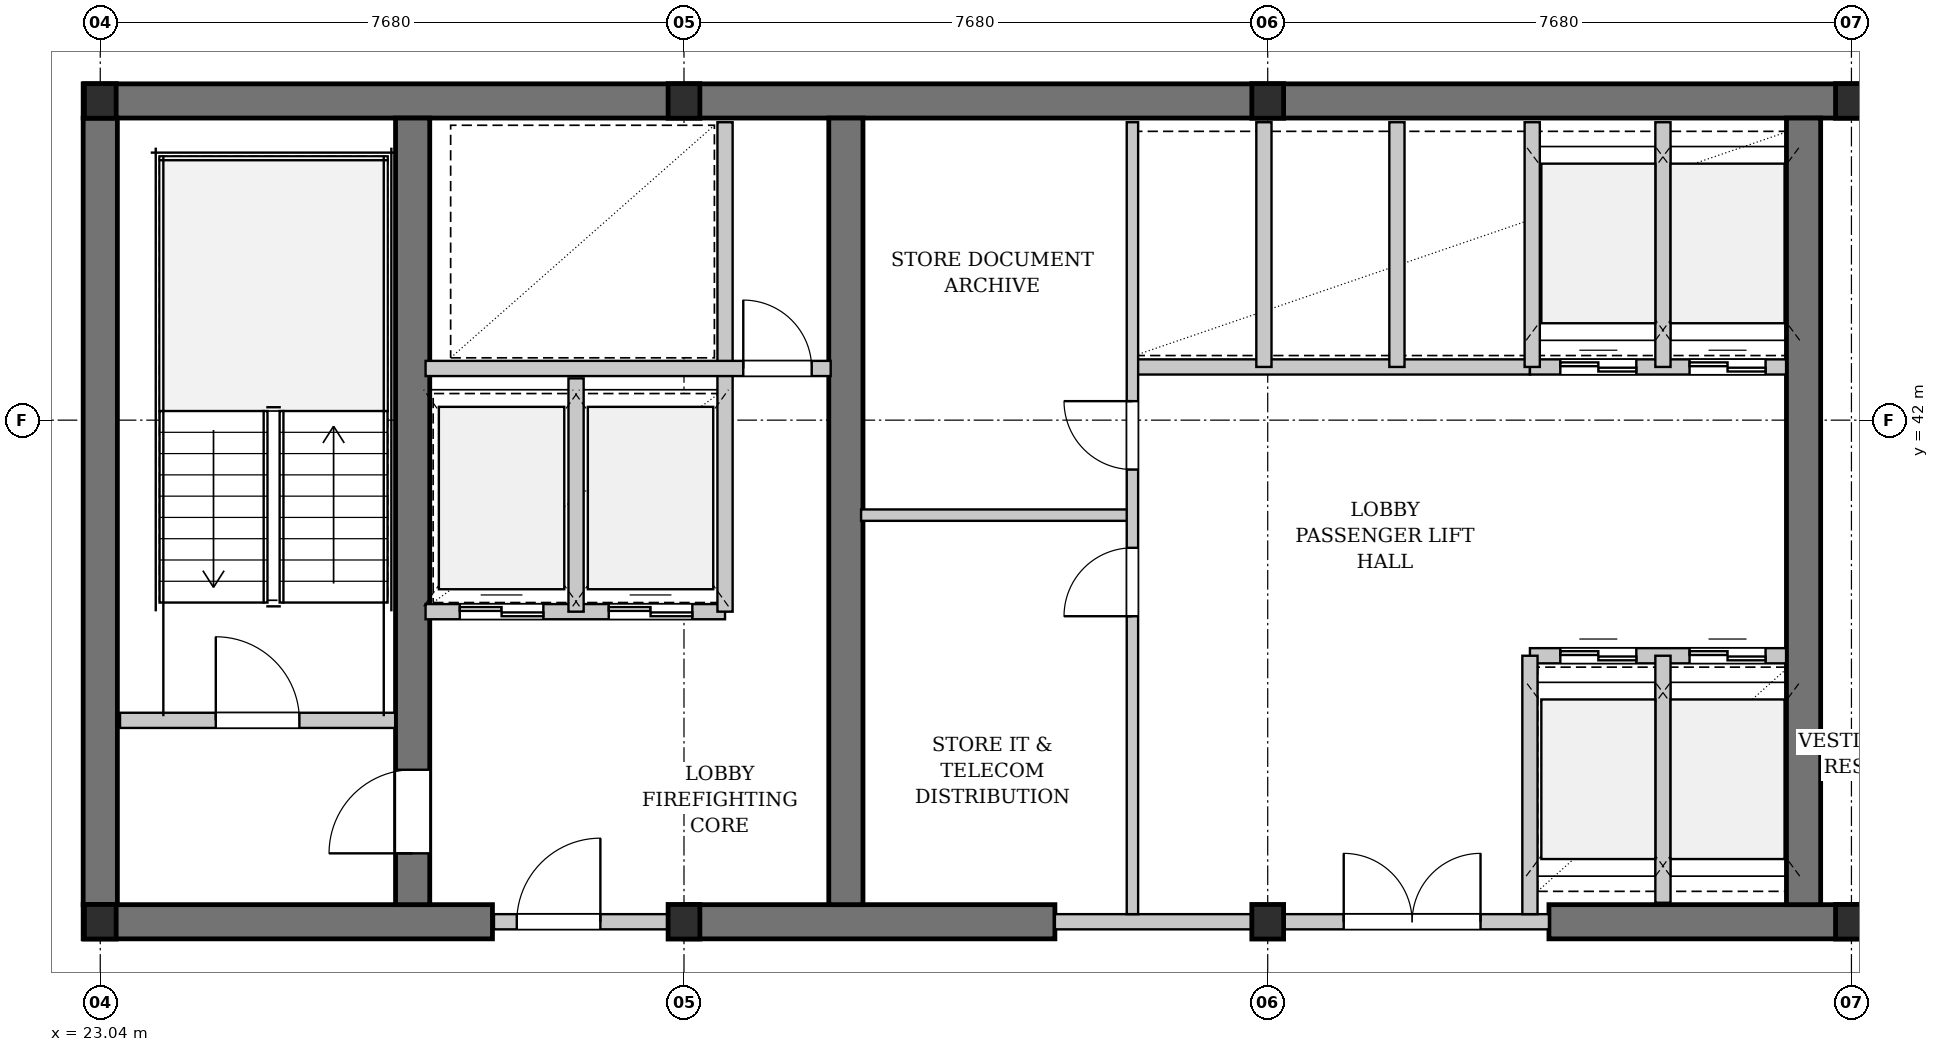
"""IFC4 building model, lengths in metres.
Left out: names, types, materials, properties, quantities, classifications, styles, units other than length and angle.
Written with IfcOpenShell. Run it as: python <this file> out.ifc"""

import sys

from ifc_helpers import new_model, si_unit, direction, frame, frame_2d, origin, origin_2d, place, context, subcontext, project, spatial, rectangle, i_section, extrude, element, fill, save


model = new_model("IFC4")
c1 = context("Model", 3, precision=1e-05, world=origin(), true_north=direction((0.0, 1.0)))
c2 = subcontext(c1, "Body", "Model", "MODEL_VIEW")
j1 = project(units=[si_unit("LENGTHUNIT", "METRE"), si_unit("PLANEANGLEUNIT", "RADIAN")], contexts=[c1])
p1 = place(None, origin())
s1 = spatial("IfcSite", under=j1, at=p1, CompositionType="ELEMENT")
p2 = place(p1, origin())
s2 = spatial("IfcBuilding", under=s1, at=p2, CompositionType="ELEMENT")
p3 = place(p2, frame((0.0, 0.0, 178.7)))
s3 = spatial("IfcBuildingStorey", under=s2, at=p3, CompositionType="ELEMENT", Elevation=178.7)
p4 = place(p3, frame((22.815, 46.2, 0.0), z_axis=(0.0, 0.0, 1.0), x_axis=(1.0, 0.0, 0.0)))
e1 = element("IfcWall", 1, at=p4, inside=s3, PredefinedType="SHEAR", context=c2, shape_type="SweptSolid", body=[
    extrude(rectangle(XDim=31.17, YDim=0.45, at=frame_2d((15.585, 0.0))), origin(), (0.0, 0.0, 1.0), 3.08),
])
p5 = place(p3, frame((22.815, 35.4, 0.0), z_axis=(0.0, 0.0, 1.0), x_axis=(1.0, 0.0, 0.0)))
e2 = element("IfcWall", 2, at=p5, inside=s3, PredefinedType="SHEAR", context=c2, shape_type="SweptSolid", body=[
    extrude(rectangle(XDim=5.385, YDim=0.45, at=frame_2d((2.692, 0.0))), origin(), (0.0, 0.0, 1.0), 3.08),
])
p6 = place(p3, frame((30.72, 35.4, 0.0), z_axis=(0.0, 0.0, 1.0), x_axis=(1.0, 0.0, 0.0)))
e3 = element("IfcWall", 3, at=p6, inside=s3, PredefinedType="SHEAR", context=c2, shape_type="SweptSolid", body=[
    extrude(rectangle(XDim=4.88, YDim=0.45, at=frame_2d((2.44, 0.0))), origin(), (0.0, 0.0, 1.0), 3.08),
])
p7 = place(p3, frame((42.1, 35.4, 0.0), z_axis=(0.0, 0.0, 1.0), x_axis=(1.0, 0.0, 0.0)))
e4 = element("IfcWall", 4, at=p7, inside=s3, PredefinedType="SHEAR", context=c2, shape_type="SweptSolid", body=[
    extrude(rectangle(XDim=8.05, YDim=0.45, at=frame_2d((4.025, 0.0))), origin(), (0.0, 0.0, 1.0), 3.08),
])
p8 = place(p7, frame((4.85, 0.0, 0.0)))
e5 = element("IfcOpeningElement", 5, at=p8, cuts=e4, PredefinedType="OPENING", context=c2, shape_type="SweptSolid", body=[
    extrude(rectangle(XDim=0.9, YDim=2.15, at=frame_2d((0.45, 1.075))), frame((0.0, 0.235, 0.0), z_axis=(0.0, -1.0, 0.0), x_axis=(1.0, 0.0, 0.0)), (0.0, 0.0, 1.0), 0.47),
])
p9 = place(p3, frame((23.04, 35.625, 0.0), z_axis=(0.0, 0.0, 1.0), x_axis=(0.0, 1.0, 0.0)))
e6 = element("IfcWall", 6, at=p9, inside=s3, PredefinedType="SHEAR", context=c2, shape_type="SweptSolid", body=[
    extrude(rectangle(XDim=10.35, YDim=0.45, at=frame_2d((5.175, 0.0))), origin(), (0.0, 0.0, 1.0), 3.08),
])
p10 = place(p3, frame((27.15, 35.625, 0.0), z_axis=(0.0, 0.0, 1.0), x_axis=(0.0, 1.0, 0.0)))
e7 = element("IfcWall", 7, at=p10, inside=s3, PredefinedType="SHEAR", context=c2, shape_type="SweptSolid", body=[
    extrude(rectangle(XDim=10.35, YDim=0.45, at=frame_2d((5.175, 0.0))), origin(), (0.0, 0.0, 1.0), 3.08),
])
p11 = place(p10, frame((0.675, 0.0, 0.0)))
e8 = element("IfcOpeningElement", 8, at=p11, cuts=e7, PredefinedType="OPENING", context=c2, shape_type="SweptSolid", body=[
    extrude(rectangle(XDim=1.1, YDim=2.15, at=frame_2d((0.55, 1.075))), frame((0.0, 0.235, 0.0), z_axis=(0.0, -1.0, 0.0), x_axis=(1.0, 0.0, 0.0)), (0.0, 0.0, 1.0), 0.47),
])
for number, where, z_axis, x_axis in (
    (9, (32.85, 35.625, 0.0), (0.0, 0.0, 1.0), (0.0, 1.0, 0.0)),
    (10, (45.45, 35.625, 0.0), (0.0, 0.0, 1.0), (0.0, 1.0, 0.0)),
):
    element("IfcWall", number, at=place(p3, frame(where, z_axis=z_axis, x_axis=x_axis)), inside=s3, PredefinedType="SHEAR", context=c2, shape_type="SweptSolid", body=[
        extrude(rectangle(XDim=10.35, YDim=0.45, at=frame_2d((5.175, 0.0))), origin(), (0.0, 0.0, 1.0), 3.08),
    ])
for number, where, z_axis, x_axis in (
    (11, (23.04, 35.4, 0.0), (0.0, 0.0, 1.0), (1.0, 0.0, 0.0)),
    (12, (23.04, 46.2, 0.0), (0.0, 0.0, 1.0), (1.0, 0.0, 0.0)),
    (13, (30.72, 35.4, 0.0), (0.0, 0.0, 1.0), (1.0, 0.0, 0.0)),
    (14, (30.72, 46.2, 0.0), (0.0, 0.0, 1.0), (1.0, 0.0, 0.0)),
    (15, (38.4, 35.4, 0.0), (0.0, 0.0, 1.0), (1.0, 0.0, 0.0)),
    (16, (38.4, 46.2, 0.0), (0.0, 0.0, 1.0), (1.0, 0.0, 0.0)),
    (17, (46.08, 35.4, 0.0), (0.0, 0.0, 1.0), (1.0, 0.0, 0.0)),
    (18, (46.08, 46.2, 0.0), (0.0, 0.0, 1.0), (1.0, 0.0, 0.0)),
):
    element("IfcColumn", number, at=place(p3, frame(where, z_axis=z_axis, x_axis=x_axis)), inside=s3, PredefinedType="COLUMN", context=c2, shape_type="SweptSolid", body=[
        extrude(i_section(OverallWidth=0.418, OverallDepth=0.455, WebThickness=0.042, FlangeThickness=0.068, FilletRadius=0.015, at=origin_2d()), origin(), (0.0, 0.0, 1.0), 3.3),
    ])
p12 = place(p3, frame((23.3, 38.05, 0.0), z_axis=(0.0, 0.0, 1.0), x_axis=(1.0, 0.0, 0.0)))
e19 = element("IfcWall", 19, at=p12, inside=s3, PredefinedType="PARTITIONING", context=c2, shape_type="SweptSolid", body=[
    extrude(rectangle(XDim=3.62, YDim=0.2, at=frame_2d((1.81, 0.0))), origin(), (0.0, 0.0, 1.0), 3.08),
])
p13 = place(p12, frame((1.26, 0.0, 0.0)))
e20 = element("IfcOpeningElement", 20, at=p13, cuts=e19, PredefinedType="OPENING", context=c2, shape_type="SweptSolid", body=[
    extrude(rectangle(XDim=1.1, YDim=2.15, at=frame_2d((0.55, 1.075))), frame((0.0, 0.11, 0.0), z_axis=(0.0, -1.0, 0.0), x_axis=(1.0, 0.0, 0.0)), (0.0, 0.0, 1.0), 0.22),
])
p14 = place(p3, frame((28.22, 35.4, 0.0), z_axis=(0.0, 0.0, 1.0), x_axis=(1.0, 0.0, 0.0)))
e21 = element("IfcWall", 21, at=p14, inside=s3, PredefinedType="PARTITIONING", context=c2, shape_type="SweptSolid", body=[
    extrude(rectangle(XDim=2.5, YDim=0.2, at=frame_2d((1.25, 0.0))), origin(), (0.0, 0.0, 1.0), 2.475),
])
p15 = place(p14, frame((0.3, 0.0, 0.0)))
e22 = element("IfcOpeningElement", 22, at=p15, cuts=e21, PredefinedType="OPENING", context=c2, shape_type="SweptSolid", body=[
    extrude(rectangle(XDim=1.1, YDim=2.15, at=frame_2d((0.55, 1.075))), frame((0.0, 0.11, 0.0), z_axis=(0.0, -1.0, 0.0), x_axis=(1.0, 0.0, 0.0)), (0.0, 0.0, 1.0), 0.22),
])
p16 = place(p3, frame((27.32, 39.48, 0.0), z_axis=(0.0, 0.0, 1.0), x_axis=(1.0, 0.0, 0.0)))
e23 = element("IfcWall", 23, at=p16, inside=s3, PredefinedType="PARTITIONING", context=c2, shape_type="SweptSolid", body=[
    extrude(rectangle(XDim=3.94, YDim=0.2, at=frame_2d((1.97, 0.0))), origin(), (0.0, 0.0, 1.0), 3.08),
])
p17 = place(p16, frame((0.45, 0.0, 0.0)))
e24 = element("IfcOpeningElement", 24, at=p17, cuts=e23, PredefinedType="OPENING", context=c2, shape_type="SweptSolid", body=[
    extrude(rectangle(XDim=1.1, YDim=2.2, at=frame_2d((0.55, 1.1))), frame((0.0, 0.11, 0.0), z_axis=(0.0, -1.0, 0.0), x_axis=(1.0, 0.0, 0.0)), (0.0, 0.0, 1.0), 0.22),
])
p18 = place(p16, frame((2.41, 0.0, 0.0)))
e25 = element("IfcOpeningElement", 25, at=p18, cuts=e23, PredefinedType="OPENING", context=c2, shape_type="SweptSolid", body=[
    extrude(rectangle(XDim=1.1, YDim=2.2, at=frame_2d((0.55, 1.1))), frame((0.0, 0.11, 0.0), z_axis=(0.0, -1.0, 0.0), x_axis=(1.0, 0.0, 0.0)), (0.0, 0.0, 1.0), 0.22),
])
p19 = place(p3, frame((29.3, 39.48, 0.0), z_axis=(0.0, 0.0, 1.0), x_axis=(0.0, 1.0, 0.0)))
e26 = element("IfcWall", 26, at=p19, inside=s3, PredefinedType="PARTITIONING", context=c2, shape_type="SweptSolid", body=[
    extrude(rectangle(XDim=3.07, YDim=0.2, at=frame_2d((1.535, 0.0))), origin(), (0.0, 0.0, 1.0), 3.08),
])
p20 = place(p3, frame((31.26, 39.48, 0.0), z_axis=(0.0, 0.0, 1.0), x_axis=(0.0, 1.0, 0.0)))
e27 = element("IfcWall", 27, at=p20, inside=s3, PredefinedType="PARTITIONING", context=c2, shape_type="SweptSolid", body=[
    extrude(rectangle(XDim=6.44, YDim=0.2, at=frame_2d((3.22, 0.0))), origin(), (0.0, 0.0, 1.0), 3.08),
])
p21 = place(p3, frame((27.32, 42.68, 0.0), z_axis=(0.0, 0.0, 1.0), x_axis=(1.0, 0.0, 0.0)))
e28 = element("IfcWall", 28, at=p21, inside=s3, PredefinedType="PARTITIONING", context=c2, shape_type="SweptSolid", body=[
    extrude(rectangle(XDim=5.33, YDim=0.2, at=frame_2d((2.665, 0.0))), origin(), (0.0, 0.0, 1.0), 3.08),
])
p22 = place(p21, frame((4.18, 0.0, 0.0)))
e29 = element("IfcOpeningElement", 29, at=p22, cuts=e28, PredefinedType="OPENING", context=c2, shape_type="SweptSolid", body=[
    extrude(rectangle(XDim=0.9, YDim=2.15, at=frame_2d((0.45, 1.075))), frame((0.0, 0.11, 0.0), z_axis=(0.0, -1.0, 0.0), x_axis=(1.0, 0.0, 0.0)), (0.0, 0.0, 1.0), 0.22),
])
p23 = place(p3, frame((35.6, 35.4, 0.0), z_axis=(0.0, 0.0, 1.0), x_axis=(1.0, 0.0, 0.0)))
e30 = element("IfcWall", 30, at=p23, inside=s3, PredefinedType="PARTITIONING", context=c2, shape_type="SweptSolid", body=[
    extrude(rectangle(XDim=6.5, YDim=0.2, at=frame_2d((3.25, 0.0))), origin(), (0.0, 0.0, 1.0), 2.475),
])
p24 = place(p23, frame((3.8, 0.0, 0.0)))
e31 = element("IfcOpeningElement", 31, at=p24, cuts=e30, PredefinedType="OPENING", context=c2, shape_type="SweptSolid", body=[
    extrude(rectangle(XDim=1.8, YDim=2.3, at=frame_2d((0.9, 1.15))), frame((0.0, 0.11, 0.0), z_axis=(0.0, -1.0, 0.0), x_axis=(1.0, 0.0, 0.0)), (0.0, 0.0, 1.0), 0.22),
])
p25 = place(p3, frame((36.6, 42.7, 0.0), z_axis=(0.0, 0.0, 1.0), x_axis=(1.0, 0.0, 0.0)))
e32 = element("IfcWall", 32, at=p25, inside=s3, PredefinedType="PARTITIONING", context=c2, shape_type="SweptSolid", body=[
    extrude(rectangle(XDim=5.25, YDim=0.2, at=frame_2d((2.625, 0.0))), origin(), (0.0, 0.0, 1.0), 3.08),
])
p26 = place(p3, frame((38.35, 42.7, 0.0), z_axis=(0.0, 0.0, 1.0), x_axis=(0.0, 1.0, 0.0)))
e33 = element("IfcWall", 33, at=p26, inside=s3, PredefinedType="PARTITIONING", context=c2, shape_type="SweptSolid", body=[
    extrude(rectangle(XDim=3.22, YDim=0.2, at=frame_2d((1.61, 0.0))), origin(), (0.0, 0.0, 1.0), 2.475),
])
p27 = place(p3, frame((40.1, 42.7, 0.0), z_axis=(0.0, 0.0, 1.0), x_axis=(0.0, 1.0, 0.0)))
e34 = element("IfcWall", 34, at=p27, inside=s3, PredefinedType="PARTITIONING", context=c2, shape_type="SweptSolid", body=[
    extrude(rectangle(XDim=3.22, YDim=0.2, at=frame_2d((1.61, 0.0))), origin(), (0.0, 0.0, 1.0), 3.08),
])
p28 = place(p3, frame((33.05, 40.75, 0.0), z_axis=(0.0, 0.0, 1.0), x_axis=(1.0, 0.0, 0.0)))
e35 = element("IfcWall", 35, at=p28, inside=s3, PredefinedType="PARTITIONING", context=c2, shape_type="SweptSolid", body=[
    extrude(rectangle(XDim=3.57, YDim=0.15, at=frame_2d((1.785, 0.0))), origin(), (0.0, 0.0, 1.0), 3.08),
])
p29 = place(p3, frame((36.62, 35.5, 0.0), z_axis=(0.0, 0.0, 1.0), x_axis=(0.0, 1.0, 0.0)))
e36 = element("IfcWall", 36, at=p29, inside=s3, PredefinedType="PARTITIONING", context=c2, shape_type="SweptSolid", body=[
    extrude(rectangle(XDim=10.42, YDim=0.15, at=frame_2d((5.21, 0.0))), origin(), (0.0, 0.0, 1.0), 3.08),
])
p30 = place(p29, frame((3.92, 0.0, 0.0)))
e37 = element("IfcOpeningElement", 37, at=p30, cuts=e36, PredefinedType="OPENING", context=c2, shape_type="SweptSolid", body=[
    extrude(rectangle(XDim=0.9, YDim=2.15, at=frame_2d((0.45, 1.075))), frame((0.0, 0.085, 0.0), z_axis=(0.0, -1.0, 0.0), x_axis=(1.0, 0.0, 0.0)), (0.0, 0.0, 1.0), 0.17),
])
p31 = place(p29, frame((5.85, 0.0, 0.0)))
e38 = element("IfcOpeningElement", 38, at=p31, cuts=e36, PredefinedType="OPENING", context=c2, shape_type="SweptSolid", body=[
    extrude(rectangle(XDim=0.9, YDim=2.15, at=frame_2d((0.45, 1.075))), frame((0.0, 0.085, 0.0), z_axis=(0.0, -1.0, 0.0), x_axis=(1.0, 0.0, 0.0)), (0.0, 0.0, 1.0), 0.17),
])
p32 = place(p3, frame((41.85, 38.9, 0.0), z_axis=(0.0, 0.0, 1.0), x_axis=(1.0, 0.0, 0.0)))
e39 = element("IfcWall", 39, at=p32, inside=s3, PredefinedType="PARTITIONING", context=c2, shape_type="SweptSolid", body=[
    extrude(rectangle(XDim=3.37, YDim=0.2, at=frame_2d((1.685, 0.0))), origin(), (0.0, 0.0, 1.0), 3.08),
])
p33 = place(p32, frame((0.4, 0.0, 0.0)))
e40 = element("IfcOpeningElement", 40, at=p33, cuts=e39, PredefinedType="OPENING", context=c2, shape_type="SweptSolid", body=[
    extrude(rectangle(XDim=1.0, YDim=2.2, at=frame_2d((0.5, 1.1))), frame((0.0, 0.11, 0.0), z_axis=(0.0, -1.0, 0.0), x_axis=(1.0, 0.0, 0.0)), (0.0, 0.0, 1.0), 0.22),
])
p34 = place(p32, frame((2.1, 0.0, 0.0)))
e41 = element("IfcOpeningElement", 41, at=p34, cuts=e39, PredefinedType="OPENING", context=c2, shape_type="SweptSolid", body=[
    extrude(rectangle(XDim=1.0, YDim=2.2, at=frame_2d((0.5, 1.1))), frame((0.0, 0.11, 0.0), z_axis=(0.0, -1.0, 0.0), x_axis=(1.0, 0.0, 0.0)), (0.0, 0.0, 1.0), 0.22),
])
p35 = place(p3, frame((41.85, 42.7, 0.0), z_axis=(0.0, 0.0, 1.0), x_axis=(1.0, 0.0, 0.0)))
e42 = element("IfcWall", 42, at=p35, inside=s3, PredefinedType="PARTITIONING", context=c2, shape_type="SweptSolid", body=[
    extrude(rectangle(XDim=3.37, YDim=0.2, at=frame_2d((1.685, 0.0))), origin(), (0.0, 0.0, 1.0), 3.08),
])
p36 = place(p35, frame((0.4, 0.0, 0.0)))
e43 = element("IfcOpeningElement", 43, at=p36, cuts=e42, PredefinedType="OPENING", context=c2, shape_type="SweptSolid", body=[
    extrude(rectangle(XDim=1.0, YDim=2.2, at=frame_2d((0.5, 1.1))), frame((0.0, 0.11, 0.0), z_axis=(0.0, -1.0, 0.0), x_axis=(1.0, 0.0, 0.0)), (0.0, 0.0, 1.0), 0.22),
])
p37 = place(p35, frame((2.1, 0.0, 0.0)))
e44 = element("IfcOpeningElement", 44, at=p37, cuts=e42, PredefinedType="OPENING", context=c2, shape_type="SweptSolid", body=[
    extrude(rectangle(XDim=1.0, YDim=2.2, at=frame_2d((0.5, 1.1))), frame((0.0, 0.11, 0.0), z_axis=(0.0, -1.0, 0.0), x_axis=(1.0, 0.0, 0.0)), (0.0, 0.0, 1.0), 0.22),
])
p38 = place(p3, frame((43.6, 35.65, 0.0), z_axis=(0.0, 0.0, 1.0), x_axis=(0.0, 1.0, 0.0)))
e45 = element("IfcWall", 45, at=p38, inside=s3, PredefinedType="PARTITIONING", context=c2, shape_type="SweptSolid", body=[
    extrude(rectangle(XDim=3.25, YDim=0.2, at=frame_2d((1.625, 0.0))), origin(), (0.0, 0.0, 1.0), 3.08),
])
p39 = place(p3, frame((43.6, 42.7, 0.0), z_axis=(0.0, 0.0, 1.0), x_axis=(0.0, 1.0, 0.0)))
e46 = element("IfcWall", 46, at=p39, inside=s3, PredefinedType="PARTITIONING", context=c2, shape_type="SweptSolid", body=[
    extrude(rectangle(XDim=3.22, YDim=0.2, at=frame_2d((1.61, 0.0))), origin(), (0.0, 0.0, 1.0), 3.08),
])
p40 = place(p3, frame((41.85, 35.5, 0.0), z_axis=(0.0, 0.0, 1.0), x_axis=(0.0, 1.0, 0.0)))
e47 = element("IfcWall", 47, at=p40, inside=s3, PredefinedType="PARTITIONING", context=c2, shape_type="SweptSolid", body=[
    extrude(rectangle(XDim=3.4, YDim=0.2, at=frame_2d((1.7, 0.0))), origin(), (0.0, 0.0, 1.0), 3.08),
])
p41 = place(p3, frame((41.88, 42.7, 0.0), z_axis=(0.0, 0.0, 1.0), x_axis=(0.0, 1.0, 0.0)))
e48 = element("IfcWall", 48, at=p41, inside=s3, PredefinedType="PARTITIONING", context=c2, shape_type="SweptSolid", body=[
    extrude(rectangle(XDim=3.22, YDim=0.2, at=frame_2d((1.61, 0.0))), origin(), (0.0, 0.0, 1.0), 3.08),
])
p42 = place(p13, origin())
e49 = element("IfcDoor", 49, at=p42, inside=s3, OperationType="SINGLE_SWING_LEFT", PredefinedType="DOOR", context=c2, shape_type="SweptSolid", body=[
    extrude(rectangle(XDim=1.1, YDim=2.15, at=frame_2d((0.55, 1.075))), frame((0.0, 0.025, 0.0), z_axis=(0.0, -1.0, 0.0), x_axis=(1.0, 0.0, 0.0)), (0.0, 0.0, 1.0), 0.05),
])
fill(e20, e49)
p43 = place(p15, origin())
e50 = element("IfcDoor", 50, at=p43, inside=s3, OperationType="SINGLE_SWING_RIGHT", PredefinedType="DOOR", context=c2, shape_type="SweptSolid", body=[
    extrude(rectangle(XDim=1.1, YDim=2.15, at=frame_2d((0.55, 1.075))), frame((0.0, 0.025, 0.0), z_axis=(0.0, -1.0, 0.0), x_axis=(1.0, 0.0, 0.0)), (0.0, 0.0, 1.0), 0.05),
])
fill(e22, e50)
p44 = place(p17, origin())
e51 = element("IfcDoor", 51, at=p44, inside=s3, OperationType="DOUBLE_DOOR_SLIDING", PredefinedType="DOOR", context=c2, shape_type="SweptSolid", body=[
    extrude(rectangle(XDim=1.1, YDim=2.2, at=frame_2d((0.55, 1.1))), frame((0.0, 0.025, 0.0), z_axis=(0.0, -1.0, 0.0), x_axis=(1.0, 0.0, 0.0)), (0.0, 0.0, 1.0), 0.05),
])
fill(e24, e51)
p45 = place(p18, origin())
e52 = element("IfcDoor", 52, at=p45, inside=s3, OperationType="DOUBLE_DOOR_SLIDING", PredefinedType="DOOR", context=c2, shape_type="SweptSolid", body=[
    extrude(rectangle(XDim=1.1, YDim=2.2, at=frame_2d((0.55, 1.1))), frame((0.0, 0.025, 0.0), z_axis=(0.0, -1.0, 0.0), x_axis=(1.0, 0.0, 0.0)), (0.0, 0.0, 1.0), 0.05),
])
fill(e25, e52)
p46 = place(p22, origin())
e53 = element("IfcDoor", 53, at=p46, inside=s3, OperationType="SINGLE_SWING_LEFT", PredefinedType="DOOR", context=c2, shape_type="SweptSolid", body=[
    extrude(rectangle(XDim=0.9, YDim=2.15, at=frame_2d((0.45, 1.075))), frame((0.0, 0.025, 0.0), z_axis=(0.0, -1.0, 0.0), x_axis=(1.0, 0.0, 0.0)), (0.0, 0.0, 1.0), 0.05),
])
fill(e29, e53)
p47 = place(p24, origin())
e54 = element("IfcDoor", 54, at=p47, inside=s3, OperationType="DOUBLE_DOOR_SINGLE_SWING", PredefinedType="DOOR", context=c2, shape_type="SweptSolid", body=[
    extrude(rectangle(XDim=1.8, YDim=2.3, at=frame_2d((0.9, 1.15))), frame((0.0, 0.025, 0.0), z_axis=(0.0, -1.0, 0.0), x_axis=(1.0, 0.0, 0.0)), (0.0, 0.0, 1.0), 0.05),
])
fill(e31, e54)
p48 = place(p30, origin())
e55 = element("IfcDoor", 55, at=p48, inside=s3, OperationType="SINGLE_SWING_LEFT", PredefinedType="DOOR", context=c2, shape_type="SweptSolid", body=[
    extrude(rectangle(XDim=0.9, YDim=2.15, at=frame_2d((0.45, 1.075))), frame((0.0, 0.025, 0.0), z_axis=(0.0, -1.0, 0.0), x_axis=(1.0, 0.0, 0.0)), (0.0, 0.0, 1.0), 0.05),
])
fill(e37, e55)
p49 = place(p31, origin())
e56 = element("IfcDoor", 56, at=p49, inside=s3, OperationType="SINGLE_SWING_RIGHT", PredefinedType="DOOR", context=c2, shape_type="SweptSolid", body=[
    extrude(rectangle(XDim=0.9, YDim=2.15, at=frame_2d((0.45, 1.075))), frame((0.0, 0.025, 0.0), z_axis=(0.0, -1.0, 0.0), x_axis=(1.0, 0.0, 0.0)), (0.0, 0.0, 1.0), 0.05),
])
fill(e38, e56)
p50 = place(p33, origin())
e57 = element("IfcDoor", 57, at=p50, inside=s3, OperationType="DOUBLE_DOOR_SLIDING", PredefinedType="DOOR", context=c2, shape_type="SweptSolid", body=[
    extrude(rectangle(XDim=1.0, YDim=2.2, at=frame_2d((0.5, 1.1))), frame((0.0, 0.025, 0.0), z_axis=(0.0, -1.0, 0.0), x_axis=(1.0, 0.0, 0.0)), (0.0, 0.0, 1.0), 0.05),
])
fill(e40, e57)
p51 = place(p34, origin())
e58 = element("IfcDoor", 58, at=p51, inside=s3, OperationType="DOUBLE_DOOR_SLIDING", PredefinedType="DOOR", context=c2, shape_type="SweptSolid", body=[
    extrude(rectangle(XDim=1.0, YDim=2.2, at=frame_2d((0.5, 1.1))), frame((0.0, 0.025, 0.0), z_axis=(0.0, -1.0, 0.0), x_axis=(1.0, 0.0, 0.0)), (0.0, 0.0, 1.0), 0.05),
])
fill(e41, e58)
p52 = place(p36, origin())
e59 = element("IfcDoor", 59, at=p52, inside=s3, OperationType="DOUBLE_DOOR_SLIDING", PredefinedType="DOOR", context=c2, shape_type="SweptSolid", body=[
    extrude(rectangle(XDim=1.0, YDim=2.2, at=frame_2d((0.5, 1.1))), frame((0.0, 0.025, 0.0), z_axis=(0.0, -1.0, 0.0), x_axis=(1.0, 0.0, 0.0)), (0.0, 0.0, 1.0), 0.05),
])
fill(e43, e59)
p53 = place(p37, origin())
e60 = element("IfcDoor", 60, at=p53, inside=s3, OperationType="DOUBLE_DOOR_SLIDING", PredefinedType="DOOR", context=c2, shape_type="SweptSolid", body=[
    extrude(rectangle(XDim=1.0, YDim=2.2, at=frame_2d((0.5, 1.1))), frame((0.0, 0.025, 0.0), z_axis=(0.0, -1.0, 0.0), x_axis=(1.0, 0.0, 0.0)), (0.0, 0.0, 1.0), 0.05),
])
fill(e44, e60)
p54 = place(p11, origin())
e61 = element("IfcDoor", 61, at=p54, inside=s3, OperationType="SINGLE_SWING_LEFT", PredefinedType="DOOR", context=c2, shape_type="SweptSolid", body=[
    extrude(rectangle(XDim=1.1, YDim=2.15, at=frame_2d((0.55, 1.075))), frame((0.0, 0.025, 0.0), z_axis=(0.0, -1.0, 0.0), x_axis=(1.0, 0.0, 0.0)), (0.0, 0.0, 1.0), 0.05),
])
fill(e8, e61)
save(model, sys.argv[1])
